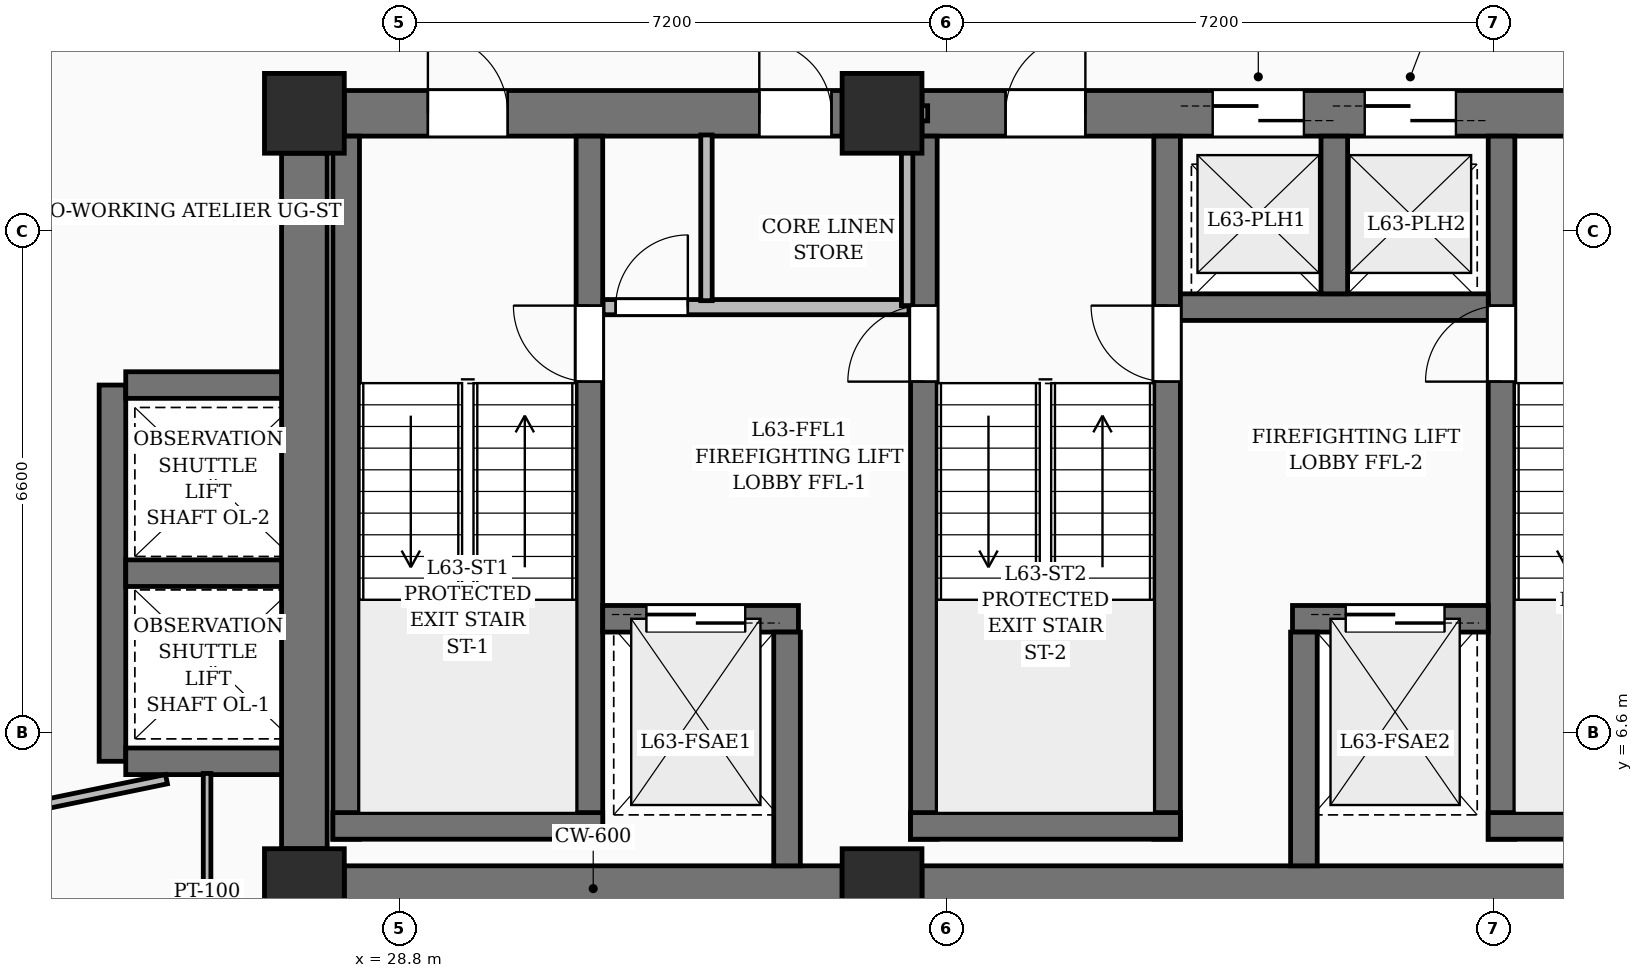
"""IFC4 building model, lengths in metres.
Left out: names, types, materials, properties, quantities, classifications, styles, units other than length and angle.
Written with IfcOpenShell. Run it as: python <this file> out.ifc"""

import sys

from ifc_helpers import new_model, si_unit, direction, frame, frame_2d, origin, origin_2d, place, context, subcontext, project, spatial, rectangle, extrude, element, fill, save


model = new_model("IFC4")
c1 = context("Model", 3, precision=1e-05, world=origin(), true_north=direction((0.0, 1.0)))
c2 = subcontext(c1, "Body", "Model", "MODEL_VIEW")
j1 = project(units=[si_unit("LENGTHUNIT", "METRE"), si_unit("PLANEANGLEUNIT", "RADIAN")], contexts=[c1])
p1 = place(None, origin())
s1 = spatial("IfcSite", under=j1, at=p1, CompositionType="ELEMENT")
p2 = place(p1, origin())
s2 = spatial("IfcBuilding", under=s1, at=p2, CompositionType="ELEMENT")
p3 = place(p2, frame((0.0, 0.0, 244.5)))
s3 = spatial("IfcBuildingStorey", under=s2, at=p3, CompositionType="ELEMENT", Elevation=244.5)
for number, where, z_axis, x_axis in (
    (1, (27.55, 4.55, 0.0), (0.0, 0.0, 1.0), (1.0, 0.0, 0.0)),
    (2, (35.15, 4.55, 0.0), (0.0, 0.0, 1.0), (1.0, 0.0, 0.0)),
    (3, (27.55, 14.75, 0.0), (0.0, 0.0, 1.0), (1.0, 0.0, 0.0)),
    (4, (35.15, 14.75, 0.0), (0.0, 0.0, 1.0), (1.0, 0.0, 0.0)),
):
    element("IfcColumn", number, at=place(p3, frame(where, z_axis=z_axis, x_axis=x_axis)), inside=s3, PredefinedType="COLUMN", context=c2, shape_type="SweptSolid", body=[
        extrude(rectangle(XDim=1.05, YDim=1.05, at=origin_2d()), origin(), (0.0, 0.0, 1.0), 3.75),
    ])
p4 = place(p3, frame((28.075, 4.55, 0.0), z_axis=(0.0, 0.0, 1.0), x_axis=(1.0, 0.0, 0.0)))
e5 = element("IfcWall", 5, at=p4, inside=s3, PredefinedType="SHEAR", context=c2, shape_type="SweptSolid", body=[
    extrude(rectangle(XDim=6.55, YDim=0.6, at=frame_2d((3.275, 0.0))), origin(), (0.0, 0.0, 1.0), 3.75),
])
p5 = place(p3, frame((35.675, 4.55, 0.0), z_axis=(0.0, 0.0, 1.0), x_axis=(1.0, 0.0, 0.0)))
e6 = element("IfcWall", 6, at=p5, inside=s3, PredefinedType="SHEAR", context=c2, shape_type="SweptSolid", body=[
    extrude(rectangle(XDim=10.85, YDim=0.6, at=frame_2d((5.425, 0.0))), origin(), (0.0, 0.0, 1.0), 3.75),
])
p6 = place(p3, frame((28.075, 14.75, 0.0), z_axis=(0.0, 0.0, 1.0), x_axis=(1.0, 0.0, 0.0)))
e7 = element("IfcWall", 7, at=p6, inside=s3, PredefinedType="SHEAR", context=c2, shape_type="SweptSolid", body=[
    extrude(rectangle(XDim=6.55, YDim=0.6, at=frame_2d((3.275, 0.0))), origin(), (0.0, 0.0, 1.0), 3.75),
])
p7 = place(p6, frame((1.1, 0.0, 0.0)))
e8 = element("IfcOpeningElement", 8, at=p7, cuts=e7, PredefinedType="OPENING", context=c2, shape_type="SweptSolid", body=[
    extrude(rectangle(XDim=1.05, YDim=2.15, at=frame_2d((0.525, 1.075))), frame((0.0, 0.31, 0.0), z_axis=(0.0, -1.0, 0.0), x_axis=(1.0, 0.0, 0.0)), (0.0, 0.0, 1.0), 0.62),
])
p8 = place(p6, frame((5.46, 0.0, 0.0)))
e9 = element("IfcOpeningElement", 9, at=p8, cuts=e7, PredefinedType="OPENING", context=c2, shape_type="SweptSolid", body=[
    extrude(rectangle(XDim=0.95, YDim=2.15, at=frame_2d((0.475, 1.075))), frame((0.0, 0.31, 0.0), z_axis=(0.0, -1.0, 0.0), x_axis=(1.0, 0.0, 0.0)), (0.0, 0.0, 1.0), 0.62),
])
p9 = place(p3, frame((35.675, 14.75, 0.0), z_axis=(0.0, 0.0, 1.0), x_axis=(1.0, 0.0, 0.0)))
e10 = element("IfcWall", 10, at=p9, inside=s3, PredefinedType="SHEAR", context=c2, shape_type="SweptSolid", body=[
    extrude(rectangle(XDim=10.85, YDim=0.6, at=frame_2d((5.425, 0.0))), origin(), (0.0, 0.0, 1.0), 3.75),
])
p10 = place(p9, frame((1.1, 0.0, 0.0)))
e11 = element("IfcOpeningElement", 11, at=p10, cuts=e10, PredefinedType="OPENING", context=c2, shape_type="SweptSolid", body=[
    extrude(rectangle(XDim=1.05, YDim=2.15, at=frame_2d((0.525, 1.075))), frame((0.0, 0.31, 0.0), z_axis=(0.0, -1.0, 0.0), x_axis=(1.0, 0.0, 0.0)), (0.0, 0.0, 1.0), 0.62),
])
p11 = place(p9, frame((8.7, 0.0, 0.0)))
e12 = element("IfcOpeningElement", 12, at=p11, cuts=e10, PredefinedType="OPENING", context=c2, shape_type="SweptSolid", body=[
    extrude(rectangle(XDim=1.05, YDim=2.15, at=frame_2d((0.525, 1.075))), frame((0.0, 0.31, 0.0), z_axis=(0.0, -1.0, 0.0), x_axis=(1.0, 0.0, 0.0)), (0.0, 0.0, 1.0), 0.62),
])
p12 = place(p9, frame((3.825, 0.0, 0.0)))
e13 = element("IfcOpeningElement", 13, at=p12, cuts=e10, PredefinedType="OPENING", context=c2, shape_type="SweptSolid", body=[
    extrude(rectangle(XDim=1.2, YDim=2.2, at=frame_2d((0.6, 1.1))), frame((0.0, 0.31, 0.0), z_axis=(0.0, -1.0, 0.0), x_axis=(1.0, 0.0, 0.0)), (0.0, 0.0, 1.0), 0.62),
])
p13 = place(p9, frame((5.825, 0.0, 0.0)))
e14 = element("IfcOpeningElement", 14, at=p13, cuts=e10, PredefinedType="OPENING", context=c2, shape_type="SweptSolid", body=[
    extrude(rectangle(XDim=1.2, YDim=2.2, at=frame_2d((0.6, 1.1))), frame((0.0, 0.31, 0.0), z_axis=(0.0, -1.0, 0.0), x_axis=(1.0, 0.0, 0.0)), (0.0, 0.0, 1.0), 0.62),
])
p14 = place(p3, frame((27.55, 5.075, 0.0), z_axis=(0.0, 0.0, 1.0), x_axis=(0.0, 1.0, 0.0)))
e15 = element("IfcWall", 15, at=p14, inside=s3, PredefinedType="SHEAR", context=c2, shape_type="SweptSolid", body=[
    extrude(rectangle(XDim=9.15, YDim=0.6, at=frame_2d((4.575, 0.0))), origin(), (0.0, 0.0, 1.0), 3.75),
])
p15 = place(p3, frame((28.1, 5.2, 0.0), z_axis=(0.0, 0.0, 1.0), x_axis=(0.0, 1.0, 0.0)))
e16 = element("IfcWall", 16, at=p15, inside=s3, PredefinedType="SOLIDWALL", context=c2, shape_type="SweptSolid", body=[
    extrude(rectangle(XDim=9.25, YDim=0.35, at=frame_2d((4.625, 0.0))), origin(), (0.0, 0.0, 1.0), 3.75),
])
p16 = place(p3, frame((31.3, 5.2, 0.0), z_axis=(0.0, 0.0, 1.0), x_axis=(0.0, 1.0, 0.0)))
e17 = element("IfcWall", 17, at=p16, inside=s3, PredefinedType="SOLIDWALL", context=c2, shape_type="SweptSolid", body=[
    extrude(rectangle(XDim=9.25, YDim=0.35, at=frame_2d((4.625, 0.0))), origin(), (0.0, 0.0, 1.0), 3.75),
])
p17 = place(p16, frame((6.02, 0.0, 0.0)))
e18 = element("IfcOpeningElement", 18, at=p17, cuts=e17, PredefinedType="OPENING", context=c2, shape_type="SweptSolid", body=[
    extrude(rectangle(XDim=1.0, YDim=2.15, at=frame_2d((0.5, 1.075))), frame((0.0, 0.185, 0.0), z_axis=(0.0, -1.0, 0.0), x_axis=(1.0, 0.0, 0.0)), (0.0, 0.0, 1.0), 0.37),
])
p18 = place(p3, frame((27.925, 5.375, 0.0), z_axis=(0.0, 0.0, 1.0), x_axis=(1.0, 0.0, 0.0)))
e19 = element("IfcWall", 19, at=p18, inside=s3, PredefinedType="SOLIDWALL", context=c2, shape_type="SweptSolid", body=[
    extrude(rectangle(XDim=3.55, YDim=0.35, at=frame_2d((1.775, 0.0))), origin(), (0.0, 0.0, 1.0), 3.75),
])
p19 = place(p3, frame((35.7, 5.2, 0.0), z_axis=(0.0, 0.0, 1.0), x_axis=(0.0, 1.0, 0.0)))
e20 = element("IfcWall", 20, at=p19, inside=s3, PredefinedType="SOLIDWALL", context=c2, shape_type="SweptSolid", body=[
    extrude(rectangle(XDim=9.25, YDim=0.35, at=frame_2d((4.625, 0.0))), origin(), (0.0, 0.0, 1.0), 3.75),
])
p20 = place(p19, frame((6.02, 0.0, 0.0)))
e21 = element("IfcOpeningElement", 21, at=p20, cuts=e20, PredefinedType="OPENING", context=c2, shape_type="SweptSolid", body=[
    extrude(rectangle(XDim=1.0, YDim=2.15, at=frame_2d((0.5, 1.075))), frame((0.0, 0.185, 0.0), z_axis=(0.0, -1.0, 0.0), x_axis=(1.0, 0.0, 0.0)), (0.0, 0.0, 1.0), 0.37),
])
p21 = place(p3, frame((38.9, 5.2, 0.0), z_axis=(0.0, 0.0, 1.0), x_axis=(0.0, 1.0, 0.0)))
e22 = element("IfcWall", 22, at=p21, inside=s3, PredefinedType="SOLIDWALL", context=c2, shape_type="SweptSolid", body=[
    extrude(rectangle(XDim=9.25, YDim=0.35, at=frame_2d((4.625, 0.0))), origin(), (0.0, 0.0, 1.0), 3.75),
])
p22 = place(p21, frame((6.02, 0.0, 0.0)))
e23 = element("IfcOpeningElement", 23, at=p22, cuts=e22, PredefinedType="OPENING", context=c2, shape_type="SweptSolid", body=[
    extrude(rectangle(XDim=1.0, YDim=2.15, at=frame_2d((0.5, 1.075))), frame((0.0, 0.185, 0.0), z_axis=(0.0, -1.0, 0.0), x_axis=(1.0, 0.0, 0.0)), (0.0, 0.0, 1.0), 0.37),
])
p23 = place(p3, frame((35.525, 5.375, 0.0), z_axis=(0.0, 0.0, 1.0), x_axis=(1.0, 0.0, 0.0)))
e24 = element("IfcWall", 24, at=p23, inside=s3, PredefinedType="SOLIDWALL", context=c2, shape_type="SweptSolid", body=[
    extrude(rectangle(XDim=3.55, YDim=0.35, at=frame_2d((1.775, 0.0))), origin(), (0.0, 0.0, 1.0), 3.75),
])
p24 = place(p3, frame((43.3, 5.2, 0.0), z_axis=(0.0, 0.0, 1.0), x_axis=(0.0, 1.0, 0.0)))
e25 = element("IfcWall", 25, at=p24, inside=s3, PredefinedType="SOLIDWALL", context=c2, shape_type="SweptSolid", body=[
    extrude(rectangle(XDim=9.25, YDim=0.35, at=frame_2d((4.625, 0.0))), origin(), (0.0, 0.0, 1.0), 3.75),
])
p25 = place(p24, frame((6.02, 0.0, 0.0)))
e26 = element("IfcOpeningElement", 26, at=p25, cuts=e25, PredefinedType="OPENING", context=c2, shape_type="SweptSolid", body=[
    extrude(rectangle(XDim=1.0, YDim=2.15, at=frame_2d((0.5, 1.075))), frame((0.0, 0.185, 0.0), z_axis=(0.0, -1.0, 0.0), x_axis=(1.0, 0.0, 0.0)), (0.0, 0.0, 1.0), 0.37),
])
p26 = place(p3, frame((43.125, 5.375, 0.0), z_axis=(0.0, 0.0, 1.0), x_axis=(1.0, 0.0, 0.0)))
e27 = element("IfcWall", 27, at=p26, inside=s3, PredefinedType="SOLIDWALL", context=c2, shape_type="SweptSolid", body=[
    extrude(rectangle(XDim=3.55, YDim=0.35, at=frame_2d((1.775, 0.0))), origin(), (0.0, 0.0, 1.0), 3.75),
])
p27 = place(p3, frame((31.475, 8.1, 0.0), z_axis=(0.0, 0.0, 1.0), x_axis=(1.0, 0.0, 0.0)))
e28 = element("IfcWall", 28, at=p27, inside=s3, PredefinedType="SOLIDWALL", context=c2, shape_type="SweptSolid", body=[
    extrude(rectangle(XDim=2.575, YDim=0.35, at=frame_2d((1.288, 0.0))), origin(), (0.0, 0.0, 1.0), 3.75),
])
p28 = place(p27, frame((0.575, 0.0, 0.0)))
e29 = element("IfcOpeningElement", 29, at=p28, cuts=e28, PredefinedType="OPENING", context=c2, shape_type="SweptSolid", body=[
    extrude(rectangle(XDim=1.3, YDim=2.25, at=frame_2d((0.65, 1.125))), frame((0.0, 0.185, 0.0), z_axis=(0.0, -1.0, 0.0), x_axis=(1.0, 0.0, 0.0)), (0.0, 0.0, 1.0), 0.37),
])
p29 = place(p3, frame((40.55, 8.1, 0.0), z_axis=(0.0, 0.0, 1.0), x_axis=(1.0, 0.0, 0.0)))
e30 = element("IfcWall", 30, at=p29, inside=s3, PredefinedType="SOLIDWALL", context=c2, shape_type="SweptSolid", body=[
    extrude(rectangle(XDim=2.575, YDim=0.35, at=frame_2d((1.288, 0.0))), origin(), (0.0, 0.0, 1.0), 3.75),
])
p30 = place(p29, frame((0.7, 0.0, 0.0)))
e31 = element("IfcOpeningElement", 31, at=p30, cuts=e30, PredefinedType="OPENING", context=c2, shape_type="SweptSolid", body=[
    extrude(rectangle(XDim=1.3, YDim=2.25, at=frame_2d((0.65, 1.125))), frame((0.0, 0.185, 0.0), z_axis=(0.0, -1.0, 0.0), x_axis=(1.0, 0.0, 0.0)), (0.0, 0.0, 1.0), 0.37),
])
for number, where, z_axis, x_axis in (
    (32, (33.9, 4.85, 0.0), (0.0, 0.0, 1.0), (0.0, 1.0, 0.0)),
    (33, (40.7, 4.85, 0.0), (0.0, 0.0, 1.0), (0.0, 1.0, 0.0)),
):
    element("IfcWall", number, at=place(p3, frame(where, z_axis=z_axis, x_axis=x_axis)), inside=s3, PredefinedType="SOLIDWALL", context=c2, shape_type="SweptSolid", body=[
        extrude(rectangle(XDim=3.075, YDim=0.35, at=frame_2d((1.538, 0.0))), origin(), (0.0, 0.0, 1.0), 3.75),
    ])
p31 = place(p3, frame((39.075, 12.2, 0.0), z_axis=(0.0, 0.0, 1.0), x_axis=(1.0, 0.0, 0.0)))
e34 = element("IfcWall", 34, at=p31, inside=s3, PredefinedType="SOLIDWALL", context=c2, shape_type="SweptSolid", body=[
    extrude(rectangle(XDim=4.05, YDim=0.35, at=frame_2d((2.025, 0.0))), origin(), (0.0, 0.0, 1.0), 3.75),
])
p32 = place(p3, frame((41.1, 12.375, 0.0), z_axis=(0.0, 0.0, 1.0), x_axis=(0.0, 1.0, 0.0)))
e35 = element("IfcWall", 35, at=p32, inside=s3, PredefinedType="SOLIDWALL", context=c2, shape_type="SweptSolid", body=[
    extrude(rectangle(XDim=2.075, YDim=0.35, at=frame_2d((1.038, 0.0))), origin(), (0.0, 0.0, 1.0), 3.75),
])
p33 = place(p3, frame((25.025, 6.225, 0.0), z_axis=(0.0, 0.0, 1.0), x_axis=(0.0, 1.0, 0.0)))
e36 = element("IfcWall", 36, at=p33, inside=s3, PredefinedType="SOLIDWALL", context=c2, shape_type="SweptSolid", body=[
    extrude(rectangle(XDim=4.95, YDim=0.35, at=frame_2d((2.475, 0.0))), origin(), (0.0, 0.0, 1.0), 3.75),
])
for number, where, z_axis, x_axis in (
    (37, (25.2, 6.225, 0.0), (0.0, 0.0, 1.0), (1.0, 0.0, 0.0)),
    (38, (25.2, 8.7, 0.0), (0.0, 0.0, 1.0), (1.0, 0.0, 0.0)),
    (39, (25.2, 11.175, 0.0), (0.0, 0.0, 1.0), (1.0, 0.0, 0.0)),
):
    element("IfcWall", number, at=place(p3, frame(where, z_axis=z_axis, x_axis=x_axis)), inside=s3, PredefinedType="SOLIDWALL", context=c2, shape_type="SweptSolid", body=[
        extrude(rectangle(XDim=2.05, YDim=0.35, at=frame_2d((1.025, 0.0))), origin(), (0.0, 0.0, 1.0), 3.75),
    ])
p34 = place(p3, frame((20.539, 10.841, 0.0), z_axis=(0.0, 0.0, 1.0), x_axis=(0.549017369907, 0.83581094007, 0.0)))
e40 = element("IfcWall", 40, at=p34, inside=s3, PredefinedType="SOLIDWALL", context=c2, shape_type="SweptSolid", body=[
    extrude(rectangle(XDim=6.677, YDim=0.3, at=frame_2d((3.339, 0.0))), origin(), (0.0, 0.0, 1.0), 3.5),
])
p35 = place(p34, frame((3.3, 0.0, 0.8)))
e41 = element("IfcOpeningElement", 41, at=p35, cuts=e40, PredefinedType="OPENING", context=c2, shape_type="SweptSolid", body=[
    extrude(rectangle(XDim=1.2, YDim=1.8, at=frame_2d((0.6, 0.9))), frame((0.0, 0.16, 0.0), z_axis=(0.0, -1.0, 0.0), x_axis=(1.0, 0.0, 0.0)), (0.0, 0.0, 1.0), 0.32),
])
p36 = place(p34, frame((0.675, 0.0, 0.8)))
e42 = element("IfcOpeningElement", 42, at=p36, cuts=e40, PredefinedType="OPENING", context=c2, shape_type="SweptSolid", body=[
    extrude(rectangle(XDim=1.2, YDim=1.8, at=frame_2d((0.6, 0.9))), frame((0.0, 0.16, 0.0), z_axis=(0.0, -1.0, 0.0), x_axis=(1.0, 0.0, 0.0)), (0.0, 0.0, 1.0), 0.32),
])
p37 = place(p3, frame((34.72, 14.75, 0.0), z_axis=(0.0, 0.0, 1.0), x_axis=(1.0, 0.0, 0.0)))
e43 = element("IfcWall", 43, at=p37, inside=s3, PredefinedType="PARTITIONING", context=c2, shape_type="SweptSolid", body=[
    extrude(rectangle(XDim=1.03, YDim=0.2, at=frame_2d((0.515, 0.0))), origin(), (0.0, 0.0, 1.0), 2.685),
])
p38 = place(p3, frame((31.48, 12.2, 0.0), z_axis=(0.0, 0.0, 1.0), x_axis=(1.0, 0.0, 0.0)))
e44 = element("IfcWall", 44, at=p38, inside=s3, PredefinedType="PARTITIONING", context=c2, shape_type="SweptSolid", body=[
    extrude(rectangle(XDim=4.025, YDim=0.2, at=frame_2d((2.012, 0.0))), origin(), (0.0, 0.0, 1.0), 3.5),
])
p39 = place(p38, frame((0.165, 0.0, 0.0)))
e45 = element("IfcOpeningElement", 45, at=p39, cuts=e44, PredefinedType="OPENING", context=c2, shape_type="SweptSolid", body=[
    extrude(rectangle(XDim=0.95, YDim=2.15, at=frame_2d((0.475, 1.075))), frame((0.0, 0.11, 0.0), z_axis=(0.0, -1.0, 0.0), x_axis=(1.0, 0.0, 0.0)), (0.0, 0.0, 1.0), 0.22),
])
p40 = place(p3, frame((32.84, 12.285, 0.0), z_axis=(0.0, 0.0, 1.0), x_axis=(0.0, 1.0, 0.0)))
e46 = element("IfcWall", 46, at=p40, inside=s3, PredefinedType="PARTITIONING", context=c2, shape_type="SweptSolid", body=[
    extrude(rectangle(XDim=2.18, YDim=0.15, at=frame_2d((1.09, 0.0))), origin(), (0.0, 0.0, 1.0), 2.685),
])
p41 = place(p3, frame((35.48, 12.22, 0.0), z_axis=(0.0, 0.0, 1.0), x_axis=(0.0, 1.0, 0.0)))
e47 = element("IfcWall", 47, at=p41, inside=s3, PredefinedType="PARTITIONING", context=c2, shape_type="SweptSolid", body=[
    extrude(rectangle(XDim=2.396, YDim=0.15, at=frame_2d((1.198, 0.0))), origin(), (0.0, 0.0, 1.0), 3.5),
])
p42 = place(p3, frame((25.736, 5.99, 0.0), z_axis=(0.0, 0.0, 1.0), x_axis=(-0.979395116574, -0.201953473926, 0.0)))
e48 = element("IfcWall", 48, at=p42, inside=s3, PredefinedType="PARTITIONING", context=c2, shape_type="SweptSolid", body=[
    extrude(rectangle(XDim=2.773, YDim=0.125, at=frame_2d((1.387, 0.0))), origin(), (0.0, 0.0, 1.0), 2.82),
])
p43 = place(p3, frame((26.27, 1.9, 0.0), z_axis=(0.0, 0.0, 1.0), x_axis=(0.0, 1.0, 0.0)))
e49 = element("IfcWall", 49, at=p43, inside=s3, PredefinedType="PARTITIONING", context=c2, shape_type="SweptSolid", body=[
    extrude(rectangle(XDim=4.165, YDim=0.1, at=frame_2d((2.083, 0.0))), origin(), (0.0, 0.0, 1.0), 2.685),
])
p44 = place(p7, origin())
e50 = element("IfcDoor", 50, at=p44, inside=s3, OperationType="SINGLE_SWING_LEFT", PredefinedType="DOOR", context=c2, shape_type="SweptSolid", body=[
    extrude(rectangle(XDim=1.05, YDim=2.15, at=frame_2d((0.525, 1.075))), frame((0.0, 0.025, 0.0), z_axis=(0.0, -1.0, 0.0), x_axis=(1.0, 0.0, 0.0)), (0.0, 0.0, 1.0), 0.05),
])
fill(e8, e50)
p45 = place(p10, origin())
e51 = element("IfcDoor", 51, at=p45, inside=s3, OperationType="SINGLE_SWING_RIGHT", PredefinedType="DOOR", context=c2, shape_type="SweptSolid", body=[
    extrude(rectangle(XDim=1.05, YDim=2.15, at=frame_2d((0.525, 1.075))), frame((0.0, 0.025, 0.0), z_axis=(0.0, -1.0, 0.0), x_axis=(1.0, 0.0, 0.0)), (0.0, 0.0, 1.0), 0.05),
])
fill(e11, e51)
p46 = place(p17, origin())
e52 = element("IfcDoor", 52, at=p46, inside=s3, OperationType="SINGLE_SWING_RIGHT", PredefinedType="DOOR", context=c2, shape_type="SweptSolid", body=[
    extrude(rectangle(XDim=1.0, YDim=2.15, at=frame_2d((0.5, 1.075))), frame((0.0, 0.025, 0.0), z_axis=(0.0, -1.0, 0.0), x_axis=(1.0, 0.0, 0.0)), (0.0, 0.0, 1.0), 0.05),
])
fill(e18, e52)
p47 = place(p20, origin())
e53 = element("IfcDoor", 53, at=p47, inside=s3, OperationType="SINGLE_SWING_LEFT", PredefinedType="DOOR", context=c2, shape_type="SweptSolid", body=[
    extrude(rectangle(XDim=1.0, YDim=2.15, at=frame_2d((0.5, 1.075))), frame((0.0, 0.025, 0.0), z_axis=(0.0, -1.0, 0.0), x_axis=(1.0, 0.0, 0.0)), (0.0, 0.0, 1.0), 0.05),
])
fill(e21, e53)
p48 = place(p22, origin())
e54 = element("IfcDoor", 54, at=p48, inside=s3, OperationType="SINGLE_SWING_RIGHT", PredefinedType="DOOR", context=c2, shape_type="SweptSolid", body=[
    extrude(rectangle(XDim=1.0, YDim=2.15, at=frame_2d((0.5, 1.075))), frame((0.0, 0.025, 0.0), z_axis=(0.0, -1.0, 0.0), x_axis=(1.0, 0.0, 0.0)), (0.0, 0.0, 1.0), 0.05),
])
fill(e23, e54)
p49 = place(p25, origin())
e55 = element("IfcDoor", 55, at=p49, inside=s3, OperationType="SINGLE_SWING_LEFT", PredefinedType="DOOR", context=c2, shape_type="SweptSolid", body=[
    extrude(rectangle(XDim=1.0, YDim=2.15, at=frame_2d((0.5, 1.075))), frame((0.0, 0.025, 0.0), z_axis=(0.0, -1.0, 0.0), x_axis=(1.0, 0.0, 0.0)), (0.0, 0.0, 1.0), 0.05),
])
fill(e26, e55)
p50 = place(p28, origin())
e56 = element("IfcDoor", 56, at=p50, inside=s3, OperationType="DOUBLE_DOOR_SLIDING", PredefinedType="DOOR", context=c2, shape_type="SweptSolid", body=[
    extrude(rectangle(XDim=1.3, YDim=2.25, at=frame_2d((0.65, 1.125))), frame((0.0, 0.025, 0.0), z_axis=(0.0, -1.0, 0.0), x_axis=(1.0, 0.0, 0.0)), (0.0, 0.0, 1.0), 0.05),
])
fill(e29, e56)
p51 = place(p30, origin())
e57 = element("IfcDoor", 57, at=p51, inside=s3, OperationType="DOUBLE_DOOR_SLIDING", PredefinedType="DOOR", context=c2, shape_type="SweptSolid", body=[
    extrude(rectangle(XDim=1.3, YDim=2.25, at=frame_2d((0.65, 1.125))), frame((0.0, 0.025, 0.0), z_axis=(0.0, -1.0, 0.0), x_axis=(1.0, 0.0, 0.0)), (0.0, 0.0, 1.0), 0.05),
])
fill(e31, e57)
p52 = place(p12, origin())
e58 = element("IfcDoor", 58, at=p52, inside=s3, OperationType="DOUBLE_DOOR_SLIDING", PredefinedType="DOOR", context=c2, shape_type="SweptSolid", body=[
    extrude(rectangle(XDim=1.2, YDim=2.2, at=frame_2d((0.6, 1.1))), frame((0.0, 0.025, 0.0), z_axis=(0.0, -1.0, 0.0), x_axis=(1.0, 0.0, 0.0)), (0.0, 0.0, 1.0), 0.05),
])
fill(e13, e58)
p53 = place(p13, origin())
e59 = element("IfcDoor", 59, at=p53, inside=s3, OperationType="DOUBLE_DOOR_SLIDING", PredefinedType="DOOR", context=c2, shape_type="SweptSolid", body=[
    extrude(rectangle(XDim=1.2, YDim=2.2, at=frame_2d((0.6, 1.1))), frame((0.0, 0.025, 0.0), z_axis=(0.0, -1.0, 0.0), x_axis=(1.0, 0.0, 0.0)), (0.0, 0.0, 1.0), 0.05),
])
fill(e14, e59)
p54 = place(p39, origin())
e60 = element("IfcDoor", 60, at=p54, inside=s3, OperationType="SINGLE_SWING_RIGHT", PredefinedType="DOOR", context=c2, shape_type="SweptSolid", body=[
    extrude(rectangle(XDim=0.95, YDim=2.15, at=frame_2d((0.475, 1.075))), frame((0.0, 0.025, 0.0), z_axis=(0.0, -1.0, 0.0), x_axis=(1.0, 0.0, 0.0)), (0.0, 0.0, 1.0), 0.05),
])
fill(e45, e60)
p55 = place(p8, origin())
e61 = element("IfcDoor", 61, at=p55, inside=s3, OperationType="SINGLE_SWING_LEFT", PredefinedType="DOOR", context=c2, shape_type="SweptSolid", body=[
    extrude(rectangle(XDim=0.95, YDim=2.15, at=frame_2d((0.475, 1.075))), frame((0.0, 0.025, 0.0), z_axis=(0.0, -1.0, 0.0), x_axis=(1.0, 0.0, 0.0)), (0.0, 0.0, 1.0), 0.05),
])
fill(e9, e61)
save(model, sys.argv[1])
